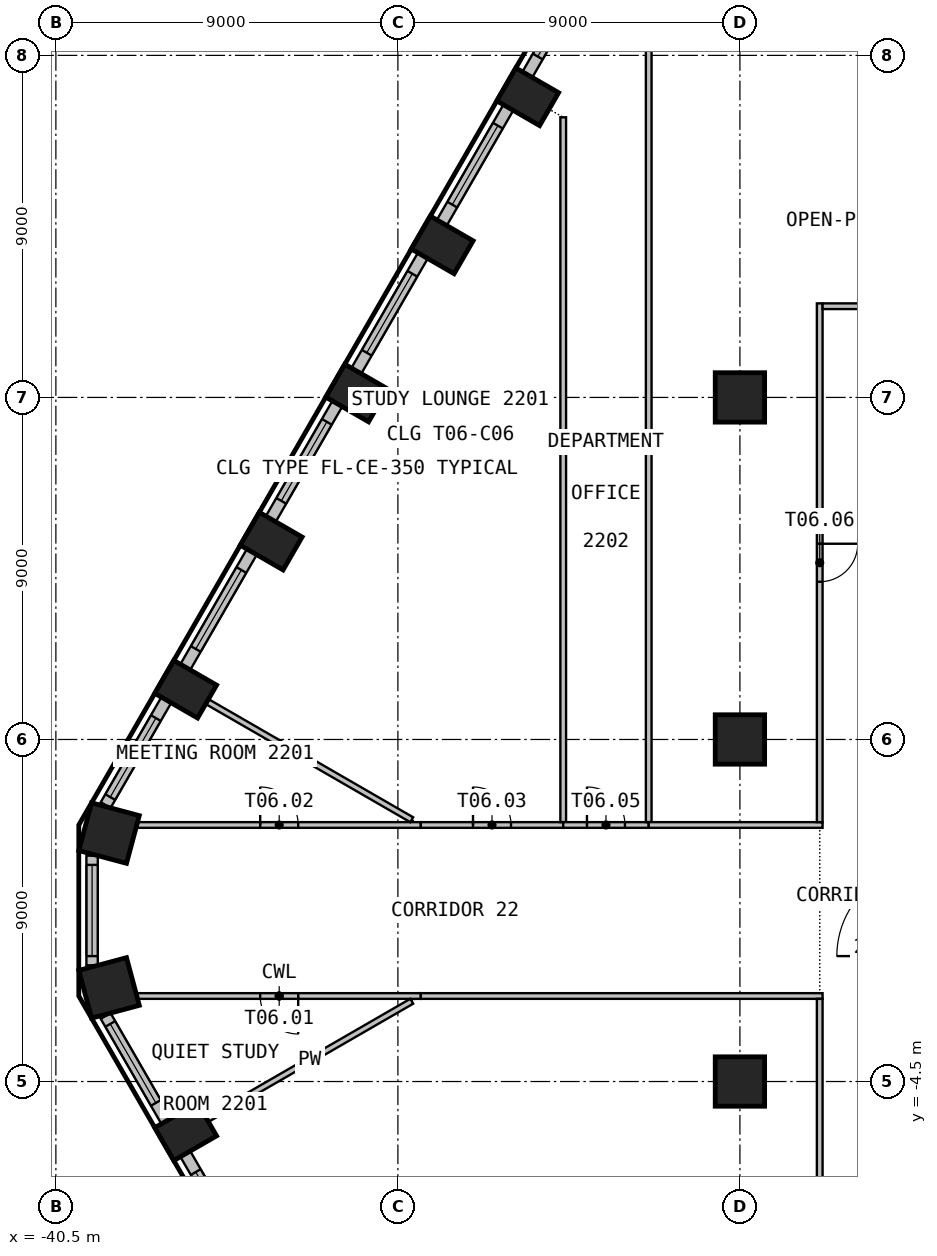
"""IFC4 building model, lengths in metres.
Left out: names, types, materials, properties, quantities, classifications, styles, units other than length and angle.
Written with IfcOpenShell. Run it as: python <this file> out.ifc"""

import sys

from ifc_helpers import new_model, si_unit, direction, frame, frame_2d, origin, origin_2d, place, context, subcontext, project, spatial, rectangle, circle, extrude, element, fill, save


model = new_model("IFC4")
c1 = context("Model", 3, precision=1e-05, world=origin(), true_north=direction((0.0, 1.0)))
c2 = subcontext(c1, "Body", "Model", "MODEL_VIEW")
j1 = project(units=[si_unit("LENGTHUNIT", "METRE"), si_unit("PLANEANGLEUNIT", "RADIAN")], contexts=[c1])
p1 = place(None, origin())
s1 = spatial("IfcSite", under=j1, at=p1, CompositionType="ELEMENT")
p2 = place(p1, origin())
s2 = spatial("IfcBuilding", under=s1, at=p2, CompositionType="ELEMENT")
p3 = place(p2, frame((0.0, 0.0, 93.0)))
s3 = spatial("IfcBuildingStorey", under=s2, at=p3, CompositionType="ELEMENT", Elevation=93.0)
for number, where, z_axis, x_axis in (
    (1, (-28.084, 21.411, 0.0), (0.0, 0.0, 1.0), (-0.5, -0.866, 0.0)),
    (2, (-30.334, 17.513, 0.0), (0.0, 0.0, 1.0), (-0.5, -0.866, 0.0)),
    (3, (-32.584, 13.616, 0.0), (0.0, 0.0, 1.0), (-0.5, -0.866, 0.0)),
    (4, (-34.834, 9.719, 0.0), (0.0, 0.0, 1.0), (-0.5, -0.866, 0.0)),
    (5, (-37.084, 5.822, 0.0), (0.0, 0.0, 1.0), (-0.5, -0.866, 0.0)),
):
    element("IfcColumn", number, at=place(p3, frame(where, z_axis=z_axis, x_axis=x_axis)), inside=s3, PredefinedType="COLUMN", context=c2, shape_type="SweptSolid", body=[
        extrude(rectangle(XDim=1.0, YDim=1.3, at=origin_2d()), origin(), (0.0, 0.0, 1.0), 3.525),
    ])
for number, where, z_axis, x_axis in (
    (6, (-39.101, 2.037, 0.0), (0.0, 0.0, 1.0), (-0.259, -0.966, 0.0)),
    (7, (-39.101, -2.037, 0.0), (0.0, 0.0, 1.0), (0.259, -0.966, 0.0)),
):
    element("IfcColumn", number, at=place(p3, frame(where, z_axis=z_axis, x_axis=x_axis)), inside=s3, PredefinedType="COLUMN", context=c2, shape_type="SweptSolid", body=[
        extrude(rectangle(XDim=1.3, YDim=1.3, at=origin_2d()), origin(), (0.0, 0.0, 1.0), 3.525),
    ])
p4 = place(p3, frame((-37.084, -5.822, 0.0), z_axis=(0.0, 0.0, 1.0), x_axis=(0.5, -0.866025403784, 0.0)))
e8 = element("IfcColumn", 8, at=p4, inside=s3, PredefinedType="COLUMN", context=c2, shape_type="SweptSolid", body=[
    extrude(rectangle(XDim=1.0, YDim=1.3, at=origin_2d()), origin(), (0.0, 0.0, 1.0), 3.525),
])
for number, where, z_axis, x_axis in (
    (9, (-22.5, -4.5, 0.0), (0.0, 0.0, 1.0), (1.0, 0.0, 0.0)),
    (10, (-22.5, 4.5, 0.0), (0.0, 0.0, 1.0), (1.0, 0.0, 0.0)),
    (11, (-22.5, 13.5, 0.0), (0.0, 0.0, 1.0), (1.0, 0.0, 0.0)),
):
    element("IfcColumn", number, at=place(p3, frame(where, z_axis=z_axis, x_axis=x_axis)), inside=s3, PredefinedType="COLUMN", context=c2, shape_type="SweptSolid", body=[
        extrude(circle(Radius=0.65, at=origin_2d()), origin(), (0.0, 0.0, 1.0), 3.525),
    ])
p5 = place(p3, frame((-26.344, 25.024, 0.0), z_axis=(0.0, 0.0, 1.0), x_axis=(-0.499996256241, -0.866027565234, 0.0)))
e12 = element("IfcWall", 12, at=p5, inside=s3, PredefinedType="SOLIDWALL", context=c2, shape_type="SweptSolid", body=[
    extrude(rectangle(XDim=3.499, YDim=0.3, at=frame_2d((1.75, 0.0))), origin(), (0.0, 0.0, 1.0), 3.525),
])
p6 = place(p5, frame((0.55, 0.0, 0.9)))
e13 = element("IfcOpeningElement", 13, at=p6, cuts=e12, PredefinedType="OPENING", context=c2, shape_type="SweptSolid", body=[
    extrude(rectangle(XDim=2.4, YDim=2.1, at=frame_2d((1.2, 1.05))), frame((0.0, 0.16, 0.0), z_axis=(0.0, -1.0, 0.0), x_axis=(1.0, 0.0, 0.0)), (0.0, 0.0, 1.0), 0.32),
])
p7 = place(p3, frame((-28.594, 21.127, 0.0), z_axis=(0.0, 0.0, 1.0), x_axis=(-0.499996256241, -0.866027565234, 0.0)))
e14 = element("IfcWall", 14, at=p7, inside=s3, PredefinedType="SOLIDWALL", context=c2, shape_type="SweptSolid", body=[
    extrude(rectangle(XDim=3.499, YDim=0.3, at=frame_2d((1.75, 0.0))), origin(), (0.0, 0.0, 1.0), 3.525),
])
p8 = place(p7, frame((0.55, 0.0, 0.9)))
e15 = element("IfcOpeningElement", 15, at=p8, cuts=e14, PredefinedType="OPENING", context=c2, shape_type="SweptSolid", body=[
    extrude(rectangle(XDim=2.4, YDim=2.1, at=frame_2d((1.2, 1.05))), frame((0.0, 0.16, 0.0), z_axis=(0.0, -1.0, 0.0), x_axis=(1.0, 0.0, 0.0)), (0.0, 0.0, 1.0), 0.32),
])
p9 = place(p3, frame((-30.844, 17.23, 0.0), z_axis=(0.0, 0.0, 1.0), x_axis=(-0.499996256241, -0.866027565234, 0.0)))
e16 = element("IfcWall", 16, at=p9, inside=s3, PredefinedType="SOLIDWALL", context=c2, shape_type="SweptSolid", body=[
    extrude(rectangle(XDim=3.499, YDim=0.3, at=frame_2d((1.75, 0.0))), origin(), (0.0, 0.0, 1.0), 3.525),
])
p10 = place(p9, frame((0.55, 0.0, 0.9)))
e17 = element("IfcOpeningElement", 17, at=p10, cuts=e16, PredefinedType="OPENING", context=c2, shape_type="SweptSolid", body=[
    extrude(rectangle(XDim=2.4, YDim=2.1, at=frame_2d((1.2, 1.05))), frame((0.0, 0.16, 0.0), z_axis=(0.0, -1.0, 0.0), x_axis=(1.0, 0.0, 0.0)), (0.0, 0.0, 1.0), 0.32),
])
p11 = place(p3, frame((-33.094, 13.333, 0.0), z_axis=(0.0, 0.0, 1.0), x_axis=(-0.499996256241, -0.866027565234, 0.0)))
e18 = element("IfcWall", 18, at=p11, inside=s3, PredefinedType="SOLIDWALL", context=c2, shape_type="SweptSolid", body=[
    extrude(rectangle(XDim=3.499, YDim=0.3, at=frame_2d((1.75, 0.0))), origin(), (0.0, 0.0, 1.0), 3.525),
])
p12 = place(p11, frame((0.55, 0.0, 0.9)))
e19 = element("IfcOpeningElement", 19, at=p12, cuts=e18, PredefinedType="OPENING", context=c2, shape_type="SweptSolid", body=[
    extrude(rectangle(XDim=2.4, YDim=2.1, at=frame_2d((1.2, 1.05))), frame((0.0, 0.16, 0.0), z_axis=(0.0, -1.0, 0.0), x_axis=(1.0, 0.0, 0.0)), (0.0, 0.0, 1.0), 0.32),
])
p13 = place(p3, frame((-35.344, 9.436, 0.0), z_axis=(0.0, 0.0, 1.0), x_axis=(-0.499996256241, -0.866027565234, 0.0)))
e20 = element("IfcWall", 20, at=p13, inside=s3, PredefinedType="SOLIDWALL", context=c2, shape_type="SweptSolid", body=[
    extrude(rectangle(XDim=3.499, YDim=0.3, at=frame_2d((1.75, 0.0))), origin(), (0.0, 0.0, 1.0), 3.525),
])
p14 = place(p13, frame((0.55, 0.0, 0.9)))
e21 = element("IfcOpeningElement", 21, at=p14, cuts=e20, PredefinedType="OPENING", context=c2, shape_type="SweptSolid", body=[
    extrude(rectangle(XDim=2.4, YDim=2.1, at=frame_2d((1.2, 1.05))), frame((0.0, 0.16, 0.0), z_axis=(0.0, -1.0, 0.0), x_axis=(1.0, 0.0, 0.0)), (0.0, 0.0, 1.0), 0.32),
])
p15 = place(p3, frame((-37.594, 5.539, 0.0), z_axis=(0.0, 0.0, 1.0), x_axis=(-0.500004907028, -0.866022570692, 0.0)))
e22 = element("IfcWall", 22, at=p15, inside=s3, PredefinedType="SOLIDWALL", context=c2, shape_type="SweptSolid", body=[
    extrude(rectangle(XDim=3.192, YDim=0.3, at=frame_2d((1.596, 0.0))), origin(), (0.0, 0.0, 1.0), 3.525),
])
p16 = place(p15, frame((0.55, 0.0, 0.9)))
e23 = element("IfcOpeningElement", 23, at=p16, cuts=e22, PredefinedType="OPENING", context=c2, shape_type="SweptSolid", body=[
    extrude(rectangle(XDim=2.4, YDim=2.1, at=frame_2d((1.2, 1.05))), frame((0.0, 0.16, 0.0), z_axis=(0.0, -1.0, 0.0), x_axis=(1.0, 0.0, 0.0)), (0.0, 0.0, 1.0), 0.32),
])
p17 = place(p3, frame((-39.547, 1.443, 0.0), z_axis=(0.0, 0.0, 1.0), x_axis=(0.0, -1.0, 0.0)))
e24 = element("IfcWall", 24, at=p17, inside=s3, PredefinedType="SOLIDWALL", context=c2, shape_type="SweptSolid", body=[
    extrude(rectangle(XDim=2.886, YDim=0.3, at=frame_2d((1.443, 0.0))), origin(), (0.0, 0.0, 1.0), 3.525),
])
p18 = place(p17, frame((0.243, 0.0, 0.9)))
e25 = element("IfcOpeningElement", 25, at=p18, cuts=e24, PredefinedType="OPENING", context=c2, shape_type="SweptSolid", body=[
    extrude(rectangle(XDim=2.4, YDim=2.1, at=frame_2d((1.2, 1.05))), frame((0.0, 0.16, 0.0), z_axis=(0.0, -1.0, 0.0), x_axis=(1.0, 0.0, 0.0)), (0.0, 0.0, 1.0), 0.32),
])
p19 = place(p3, frame((-39.19, -2.774, 0.0), z_axis=(0.0, 0.0, 1.0), x_axis=(0.500004907028, -0.866022570692, 0.0)))
e26 = element("IfcWall", 26, at=p19, inside=s3, PredefinedType="SOLIDWALL", context=c2, shape_type="SweptSolid", body=[
    extrude(rectangle(XDim=3.192, YDim=0.3, at=frame_2d((1.596, 0.0))), origin(), (0.0, 0.0, 1.0), 3.525),
])
p20 = place(p19, frame((0.243, 0.0, 0.9)))
e27 = element("IfcOpeningElement", 27, at=p20, cuts=e26, PredefinedType="OPENING", context=c2, shape_type="SweptSolid", body=[
    extrude(rectangle(XDim=2.4, YDim=2.1, at=frame_2d((1.2, 1.05))), frame((0.0, 0.16, 0.0), z_axis=(0.0, -1.0, 0.0), x_axis=(1.0, 0.0, 0.0)), (0.0, 0.0, 1.0), 0.32),
])
p21 = place(p3, frame((-37.094, -6.406, 0.0), z_axis=(0.0, 0.0, 1.0), x_axis=(0.499996256241, -0.866027565234, 0.0)))
e28 = element("IfcWall", 28, at=p21, inside=s3, PredefinedType="SOLIDWALL", context=c2, shape_type="SweptSolid", body=[
    extrude(rectangle(XDim=3.499, YDim=0.3, at=frame_2d((1.75, 0.0))), origin(), (0.0, 0.0, 1.0), 3.525),
])
p22 = place(p21, frame((0.55, 0.0, 0.9)))
e29 = element("IfcOpeningElement", 29, at=p22, cuts=e28, PredefinedType="OPENING", context=c2, shape_type="SweptSolid", body=[
    extrude(rectangle(XDim=2.4, YDim=2.1, at=frame_2d((1.2, 1.05))), frame((0.0, 0.16, 0.0), z_axis=(0.0, -1.0, 0.0), x_axis=(1.0, 0.0, 0.0)), (0.0, 0.0, 1.0), 0.32),
])
p23 = place(p3, frame((-30.897, -2.25, 0.0), z_axis=(0.0, 0.0, 1.0), x_axis=(-1.0, 0.0, 0.0)))
e30 = element("IfcWall", 30, at=p23, inside=s3, PredefinedType="PARTITIONING", context=c2, shape_type="SweptSolid", body=[
    extrude(rectangle(XDim=7.453, YDim=0.15, at=frame_2d((3.727, 0.0))), origin(), (0.0, 0.0, 1.0), 3.525),
])
p24 = place(p23, frame((3.227, 0.0, 0.0)))
e31 = element("IfcOpeningElement", 31, at=p24, cuts=e30, PredefinedType="OPENING", context=c2, shape_type="SweptSolid", body=[
    extrude(rectangle(XDim=1.0, YDim=2.1, at=frame_2d((0.5, 1.05))), frame((0.0, 0.085, 0.0), z_axis=(0.0, -1.0, 0.0), x_axis=(1.0, 0.0, 0.0)), (0.0, 0.0, 1.0), 0.17),
])
p25 = place(p3, frame((-38.35, 2.25, 0.0), z_axis=(0.0, 0.0, 1.0), x_axis=(1.0, 0.0, 0.0)))
e32 = element("IfcWall", 32, at=p25, inside=s3, PredefinedType="PARTITIONING", context=c2, shape_type="SweptSolid", body=[
    extrude(rectangle(XDim=7.453, YDim=0.15, at=frame_2d((3.727, 0.0))), origin(), (0.0, 0.0, 1.0), 3.525),
])
p26 = place(p25, frame((3.227, 0.0, 0.0)))
e33 = element("IfcOpeningElement", 33, at=p26, cuts=e32, PredefinedType="OPENING", context=c2, shape_type="SweptSolid", body=[
    extrude(rectangle(XDim=1.0, YDim=2.1, at=frame_2d((0.5, 1.05))), frame((0.0, 0.085, 0.0), z_axis=(0.0, -1.0, 0.0), x_axis=(1.0, 0.0, 0.0)), (0.0, 0.0, 1.0), 0.17),
])
for number, where, z_axis, x_axis in (
    (34, (-31.135, -2.387, 0.0), (0.0, 0.0, 1.0), (-0.866, -0.5, 0.0)),
    (35, (-36.504, 5.487, 0.0), (0.0, 0.0, 1.0), (0.866, -0.5, 0.0)),
):
    element("IfcWall", number, at=place(p3, frame(where, z_axis=z_axis, x_axis=x_axis)), inside=s3, PredefinedType="PARTITIONING", context=c2, shape_type="SweptSolid", body=[
        extrude(rectangle(XDim=6.199, YDim=0.15, at=frame_2d((3.1, 0.0))), origin(), (0.0, 0.0, 1.0), 3.525),
    ])
p27 = place(p3, frame((-20.325, -2.25, 0.0), z_axis=(0.0, 0.0, 1.0), x_axis=(-1.0, 0.0, 0.0)))
e36 = element("IfcWall", 36, at=p27, inside=s3, PredefinedType="PARTITIONING", context=c2, shape_type="SweptSolid", body=[
    extrude(rectangle(XDim=10.572, YDim=0.15, at=frame_2d((5.286, 0.0))), origin(), (0.0, 0.0, 1.0), 3.525),
])
p28 = place(p3, frame((-30.897, 2.25, 0.0), z_axis=(0.0, 0.0, 1.0), x_axis=(1.0, 0.0, 0.0)))
e37 = element("IfcWall", 37, at=p28, inside=s3, PredefinedType="PARTITIONING", context=c2, shape_type="SweptSolid", body=[
    extrude(rectangle(XDim=3.747, YDim=0.15, at=frame_2d((1.874, 0.0))), origin(), (0.0, 0.0, 1.0), 3.525),
])
p29 = place(p28, frame((1.374, 0.0, 0.0)))
e38 = element("IfcOpeningElement", 38, at=p29, cuts=e37, PredefinedType="OPENING", context=c2, shape_type="SweptSolid", body=[
    extrude(rectangle(XDim=1.0, YDim=2.1, at=frame_2d((0.5, 1.05))), frame((0.0, 0.085, 0.0), z_axis=(0.0, -1.0, 0.0), x_axis=(1.0, 0.0, 0.0)), (0.0, 0.0, 1.0), 0.17),
])
p30 = place(p3, frame((-27.15, 20.871, 0.0), z_axis=(0.0, 0.0, 1.0), x_axis=(0.0, -1.0, 0.0)))
e39 = element("IfcWall", 39, at=p30, inside=s3, PredefinedType="PARTITIONING", context=c2, shape_type="SweptSolid", body=[
    extrude(rectangle(XDim=18.546, YDim=0.15, at=frame_2d((9.273, 0.0))), origin(), (0.0, 0.0, 1.0), 3.525),
])
p31 = place(p3, frame((-27.15, 2.25, 0.0), z_axis=(0.0, 0.0, 1.0), x_axis=(1.0, 0.0, 0.0)))
e40 = element("IfcWall", 40, at=p31, inside=s3, PredefinedType="PARTITIONING", context=c2, shape_type="SweptSolid", body=[
    extrude(rectangle(XDim=2.25, YDim=0.15, at=frame_2d((1.125, 0.0))), origin(), (0.0, 0.0, 1.0), 3.525),
])
p32 = place(p31, frame((0.625, 0.0, 0.0)))
e41 = element("IfcOpeningElement", 41, at=p32, cuts=e40, PredefinedType="OPENING", context=c2, shape_type="SweptSolid", body=[
    extrude(rectangle(XDim=1.0, YDim=2.1, at=frame_2d((0.5, 1.05))), frame((0.0, 0.085, 0.0), z_axis=(0.0, -1.0, 0.0), x_axis=(1.0, 0.0, 0.0)), (0.0, 0.0, 1.0), 0.17),
])
p33 = place(p3, frame((-24.9, 24.693, 0.0), z_axis=(0.0, 0.0, 1.0), x_axis=(0.0, -1.0, 0.0)))
e42 = element("IfcWall", 42, at=p33, inside=s3, PredefinedType="PARTITIONING", context=c2, shape_type="SweptSolid", body=[
    extrude(rectangle(XDim=22.368, YDim=0.15, at=frame_2d((11.184, 0.0))), origin(), (0.0, 0.0, 1.0), 3.525),
])
p34 = place(p3, frame((-24.9, 2.25, 0.0), z_axis=(0.0, 0.0, 1.0), x_axis=(1.0, 0.0, 0.0)))
e43 = element("IfcWall", 43, at=p34, inside=s3, PredefinedType="PARTITIONING", context=c2, shape_type="SweptSolid", body=[
    extrude(rectangle(XDim=4.575, YDim=0.15, at=frame_2d((2.288, 0.0))), origin(), (0.0, 0.0, 1.0), 3.525),
])
p35 = place(p3, frame((-20.4, -2.325, 0.0), z_axis=(0.0, 0.0, 1.0), x_axis=(0.0, -1.0, 0.0)))
e44 = element("IfcWall", 44, at=p35, inside=s3, PredefinedType="PARTITIONING", context=c2, shape_type="SweptSolid", body=[
    extrude(rectangle(XDim=13.65, YDim=0.15, at=frame_2d((6.825, 0.0))), origin(), (0.0, 0.0, 1.0), 3.525),
])
p36 = place(p35, frame((6.325, 0.0, 0.0)))
e45 = element("IfcOpeningElement", 45, at=p36, cuts=e44, PredefinedType="OPENING", context=c2, shape_type="SweptSolid", body=[
    extrude(rectangle(XDim=1.0, YDim=2.1, at=frame_2d((0.5, 1.05))), frame((0.0, 0.085, 0.0), z_axis=(0.0, -1.0, 0.0), x_axis=(1.0, 0.0, 0.0)), (0.0, 0.0, 1.0), 0.17),
])
p37 = place(p3, frame((-20.4, 15.975, 0.0), z_axis=(0.0, 0.0, 1.0), x_axis=(0.0, -1.0, 0.0)))
e46 = element("IfcWall", 46, at=p37, inside=s3, PredefinedType="PARTITIONING", context=c2, shape_type="SweptSolid", body=[
    extrude(rectangle(XDim=13.65, YDim=0.15, at=frame_2d((6.825, 0.0))), origin(), (0.0, 0.0, 1.0), 3.525),
])
p38 = place(p37, frame((6.325, 0.0, 0.0)))
e47 = element("IfcOpeningElement", 47, at=p38, cuts=e46, PredefinedType="OPENING", context=c2, shape_type="SweptSolid", body=[
    extrude(rectangle(XDim=1.0, YDim=2.1, at=frame_2d((0.5, 1.05))), frame((0.0, 0.085, 0.0), z_axis=(0.0, -1.0, 0.0), x_axis=(1.0, 0.0, 0.0)), (0.0, 0.0, 1.0), 0.17),
])
p39 = place(p3, frame((-11.25, 15.9, 0.0), z_axis=(0.0, 0.0, 1.0), x_axis=(-1.0, 0.0, 0.0)))
e48 = element("IfcWall", 48, at=p39, inside=s3, PredefinedType="PARTITIONING", context=c2, shape_type="SweptSolid", body=[
    extrude(rectangle(XDim=9.075, YDim=0.15, at=frame_2d((4.538, 0.0))), origin(), (0.0, 0.0, 1.0), 3.525),
])
p40 = place(p6, origin())
e49 = element("IfcWindow", 49, at=p40, inside=s3, PartitioningType="SINGLE_PANEL", PredefinedType="WINDOW", context=c2, shape_type="SweptSolid", body=[
    extrude(rectangle(XDim=2.4, YDim=2.1, at=frame_2d((1.2, 1.05))), frame((0.0, 0.03, 0.0), z_axis=(0.0, -1.0, 0.0), x_axis=(1.0, 0.0, 0.0)), (0.0, 0.0, 1.0), 0.06),
])
fill(e13, e49)
p41 = place(p8, origin())
e50 = element("IfcWindow", 50, at=p41, inside=s3, PartitioningType="SINGLE_PANEL", PredefinedType="WINDOW", context=c2, shape_type="SweptSolid", body=[
    extrude(rectangle(XDim=2.4, YDim=2.1, at=frame_2d((1.2, 1.05))), frame((0.0, 0.03, 0.0), z_axis=(0.0, -1.0, 0.0), x_axis=(1.0, 0.0, 0.0)), (0.0, 0.0, 1.0), 0.06),
])
fill(e15, e50)
p42 = place(p10, origin())
e51 = element("IfcWindow", 51, at=p42, inside=s3, PartitioningType="SINGLE_PANEL", PredefinedType="WINDOW", context=c2, shape_type="SweptSolid", body=[
    extrude(rectangle(XDim=2.4, YDim=2.1, at=frame_2d((1.2, 1.05))), frame((0.0, 0.03, 0.0), z_axis=(0.0, -1.0, 0.0), x_axis=(1.0, 0.0, 0.0)), (0.0, 0.0, 1.0), 0.06),
])
fill(e17, e51)
p43 = place(p12, origin())
e52 = element("IfcWindow", 52, at=p43, inside=s3, PartitioningType="SINGLE_PANEL", PredefinedType="WINDOW", context=c2, shape_type="SweptSolid", body=[
    extrude(rectangle(XDim=2.4, YDim=2.1, at=frame_2d((1.2, 1.05))), frame((0.0, 0.03, 0.0), z_axis=(0.0, -1.0, 0.0), x_axis=(1.0, 0.0, 0.0)), (0.0, 0.0, 1.0), 0.06),
])
fill(e19, e52)
p44 = place(p14, origin())
e53 = element("IfcWindow", 53, at=p44, inside=s3, PartitioningType="SINGLE_PANEL", PredefinedType="WINDOW", context=c2, shape_type="SweptSolid", body=[
    extrude(rectangle(XDim=2.4, YDim=2.1, at=frame_2d((1.2, 1.05))), frame((0.0, 0.03, 0.0), z_axis=(0.0, -1.0, 0.0), x_axis=(1.0, 0.0, 0.0)), (0.0, 0.0, 1.0), 0.06),
])
fill(e21, e53)
p45 = place(p16, origin())
e54 = element("IfcWindow", 54, at=p45, inside=s3, PartitioningType="SINGLE_PANEL", PredefinedType="WINDOW", context=c2, shape_type="SweptSolid", body=[
    extrude(rectangle(XDim=2.4, YDim=2.1, at=frame_2d((1.2, 1.05))), frame((0.0, 0.03, 0.0), z_axis=(0.0, -1.0, 0.0), x_axis=(1.0, 0.0, 0.0)), (0.0, 0.0, 1.0), 0.06),
])
fill(e23, e54)
p46 = place(p18, origin())
e55 = element("IfcWindow", 55, at=p46, inside=s3, PartitioningType="SINGLE_PANEL", PredefinedType="WINDOW", context=c2, shape_type="SweptSolid", body=[
    extrude(rectangle(XDim=2.4, YDim=2.1, at=frame_2d((1.2, 1.05))), frame((0.0, 0.03, 0.0), z_axis=(0.0, -1.0, 0.0), x_axis=(1.0, 0.0, 0.0)), (0.0, 0.0, 1.0), 0.06),
])
fill(e25, e55)
p47 = place(p20, origin())
e56 = element("IfcWindow", 56, at=p47, inside=s3, PartitioningType="SINGLE_PANEL", PredefinedType="WINDOW", context=c2, shape_type="SweptSolid", body=[
    extrude(rectangle(XDim=2.4, YDim=2.1, at=frame_2d((1.2, 1.05))), frame((0.0, 0.03, 0.0), z_axis=(0.0, -1.0, 0.0), x_axis=(1.0, 0.0, 0.0)), (0.0, 0.0, 1.0), 0.06),
])
fill(e27, e56)
p48 = place(p22, origin())
e57 = element("IfcWindow", 57, at=p48, inside=s3, PartitioningType="SINGLE_PANEL", PredefinedType="WINDOW", context=c2, shape_type="SweptSolid", body=[
    extrude(rectangle(XDim=2.4, YDim=2.1, at=frame_2d((1.2, 1.05))), frame((0.0, 0.03, 0.0), z_axis=(0.0, -1.0, 0.0), x_axis=(1.0, 0.0, 0.0)), (0.0, 0.0, 1.0), 0.06),
])
fill(e29, e57)
p49 = place(p24, origin())
e58 = element("IfcDoor", 58, at=p49, inside=s3, OperationType="SINGLE_SWING_RIGHT", PredefinedType="DOOR", context=c2, shape_type="SweptSolid", body=[
    extrude(rectangle(XDim=1.0, YDim=2.1, at=frame_2d((0.5, 1.05))), frame((0.0, 0.025, 0.0), z_axis=(0.0, -1.0, 0.0), x_axis=(1.0, 0.0, 0.0)), (0.0, 0.0, 1.0), 0.05),
])
fill(e31, e58)
p50 = place(p26, origin())
e59 = element("IfcDoor", 59, at=p50, inside=s3, OperationType="SINGLE_SWING_LEFT", PredefinedType="DOOR", context=c2, shape_type="SweptSolid", body=[
    extrude(rectangle(XDim=1.0, YDim=2.1, at=frame_2d((0.5, 1.05))), frame((0.0, 0.025, 0.0), z_axis=(0.0, -1.0, 0.0), x_axis=(1.0, 0.0, 0.0)), (0.0, 0.0, 1.0), 0.05),
])
fill(e33, e59)
p51 = place(p29, origin())
e60 = element("IfcDoor", 60, at=p51, inside=s3, OperationType="SINGLE_SWING_RIGHT", PredefinedType="DOOR", context=c2, shape_type="SweptSolid", body=[
    extrude(rectangle(XDim=1.0, YDim=2.1, at=frame_2d((0.5, 1.05))), frame((0.0, 0.025, 0.0), z_axis=(0.0, -1.0, 0.0), x_axis=(1.0, 0.0, 0.0)), (0.0, 0.0, 1.0), 0.05),
])
fill(e38, e60)
p52 = place(p32, origin())
e61 = element("IfcDoor", 61, at=p52, inside=s3, OperationType="SINGLE_SWING_LEFT", PredefinedType="DOOR", context=c2, shape_type="SweptSolid", body=[
    extrude(rectangle(XDim=1.0, YDim=2.1, at=frame_2d((0.5, 1.05))), frame((0.0, 0.025, 0.0), z_axis=(0.0, -1.0, 0.0), x_axis=(1.0, 0.0, 0.0)), (0.0, 0.0, 1.0), 0.05),
])
fill(e41, e61)
p53 = place(p38, origin())
e62 = element("IfcDoor", 62, at=p53, inside=s3, OperationType="SINGLE_SWING_RIGHT", PredefinedType="DOOR", context=c2, shape_type="SweptSolid", body=[
    extrude(rectangle(XDim=1.0, YDim=2.1, at=frame_2d((0.5, 1.05))), frame((0.0, 0.025, 0.0), z_axis=(0.0, -1.0, 0.0), x_axis=(1.0, 0.0, 0.0)), (0.0, 0.0, 1.0), 0.05),
])
fill(e47, e62)
save(model, sys.argv[1])
